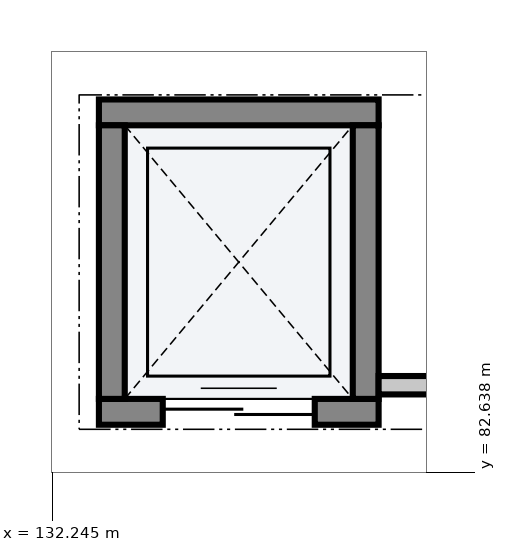
"""IFC4 building model, lengths in metres.
Left out: names, types, materials, properties, quantities, classifications, styles, units other than length and angle.
Written with IfcOpenShell. Run it as: python <this file> out.ifc"""

import sys

from ifc_helpers import new_model, si_unit, direction, frame, frame_2d, origin, place, context, subcontext, project, spatial, rectangle, extrude, element, fill, save


model = new_model("IFC4")
c1 = context("Model", 3, precision=1e-05, world=origin(), true_north=direction((0.0, 1.0)))
c2 = subcontext(c1, "Body", "Model", "MODEL_VIEW")
j1 = project(units=[si_unit("LENGTHUNIT", "METRE"), si_unit("PLANEANGLEUNIT", "RADIAN")], contexts=[c1])
p1 = place(None, origin())
s1 = spatial("IfcSite", under=j1, at=p1, CompositionType="ELEMENT")
p2 = place(p1, origin())
s2 = spatial("IfcBuilding", under=s1, at=p2, CompositionType="ELEMENT")
p3 = place(p2, frame((0.0, 0.0, 5.4)))
s3 = spatial("IfcBuildingStorey", under=s2, at=p3, CompositionType="ELEMENT", Elevation=5.4)
p4 = place(p3, frame((132.86, 83.43, 0.0), z_axis=(0.0, 0.0, 1.0), x_axis=(1.0, 0.0, 0.0)))
e1 = element("IfcWall", 1, at=p4, inside=s3, PredefinedType="SHEAR", context=c2, shape_type="SweptSolid", body=[
    extrude(rectangle(XDim=3.68, YDim=0.34, at=frame_2d((1.84, 0.0))), origin(), (0.0, 0.0, 1.0), 4.505),
])
p5 = place(p4, frame((0.84, 0.0, 0.0)))
e2 = element("IfcOpeningElement", 2, at=p5, cuts=e1, PredefinedType="OPENING", context=c2, shape_type="SweptSolid", body=[
    extrude(rectangle(XDim=2.0, YDim=2.4, at=frame_2d((1.0, 1.2))), frame((0.0, 0.182, 0.0), z_axis=(0.0, -1.0, 0.0), x_axis=(1.0, 0.0, 0.0)), (0.0, 0.0, 1.0), 0.364),
])
p6 = place(p3, frame((132.86, 87.37, 0.0), z_axis=(0.0, 0.0, 1.0), x_axis=(1.0, 0.0, 0.0)))
e3 = element("IfcWall", 3, at=p6, inside=s3, PredefinedType="SHEAR", context=c2, shape_type="SweptSolid", body=[
    extrude(rectangle(XDim=3.68, YDim=0.34, at=frame_2d((1.84, 0.0))), origin(), (0.0, 0.0, 1.0), 4.505),
])
for number, where, z_axis, x_axis in (
    (4, (133.03, 83.6, 0.0), (0.0, 0.0, 1.0), (0.0, 1.0, 0.0)),
    (5, (136.37, 83.6, 0.0), (0.0, 0.0, 1.0), (0.0, 1.0, 0.0)),
):
    element("IfcWall", number, at=place(p3, frame(where, z_axis=z_axis, x_axis=x_axis)), inside=s3, PredefinedType="SHEAR", context=c2, shape_type="SweptSolid", body=[
        extrude(rectangle(XDim=3.6, YDim=0.34, at=frame_2d((1.8, 0.0))), origin(), (0.0, 0.0, 1.0), 4.505),
    ])
p7 = place(p3, frame((141.86, 83.78, 0.0), z_axis=(0.0, 0.0, 1.0), x_axis=(-1.0, 0.0, 0.0)))
e6 = element("IfcWall", 6, at=p7, inside=s3, PredefinedType="PARTITIONING", context=c2, shape_type="SweptSolid", body=[
    extrude(rectangle(XDim=5.32, YDim=0.242, at=frame_2d((2.66, 0.0))), origin(), (0.0, 0.0, 1.0), 3.445),
])
p8 = place(p5, origin())
e7 = element("IfcDoor", 7, at=p8, inside=s3, OperationType="DOUBLE_DOOR_SLIDING", PredefinedType="DOOR", context=c2, shape_type="SweptSolid", body=[
    extrude(rectangle(XDim=2.0, YDim=2.4, at=frame_2d((1.0, 1.2))), frame((0.0, 0.025, 0.0), z_axis=(0.0, -1.0, 0.0), x_axis=(1.0, 0.0, 0.0)), (0.0, 0.0, 1.0), 0.05),
])
fill(e2, e7)
save(model, sys.argv[1])
